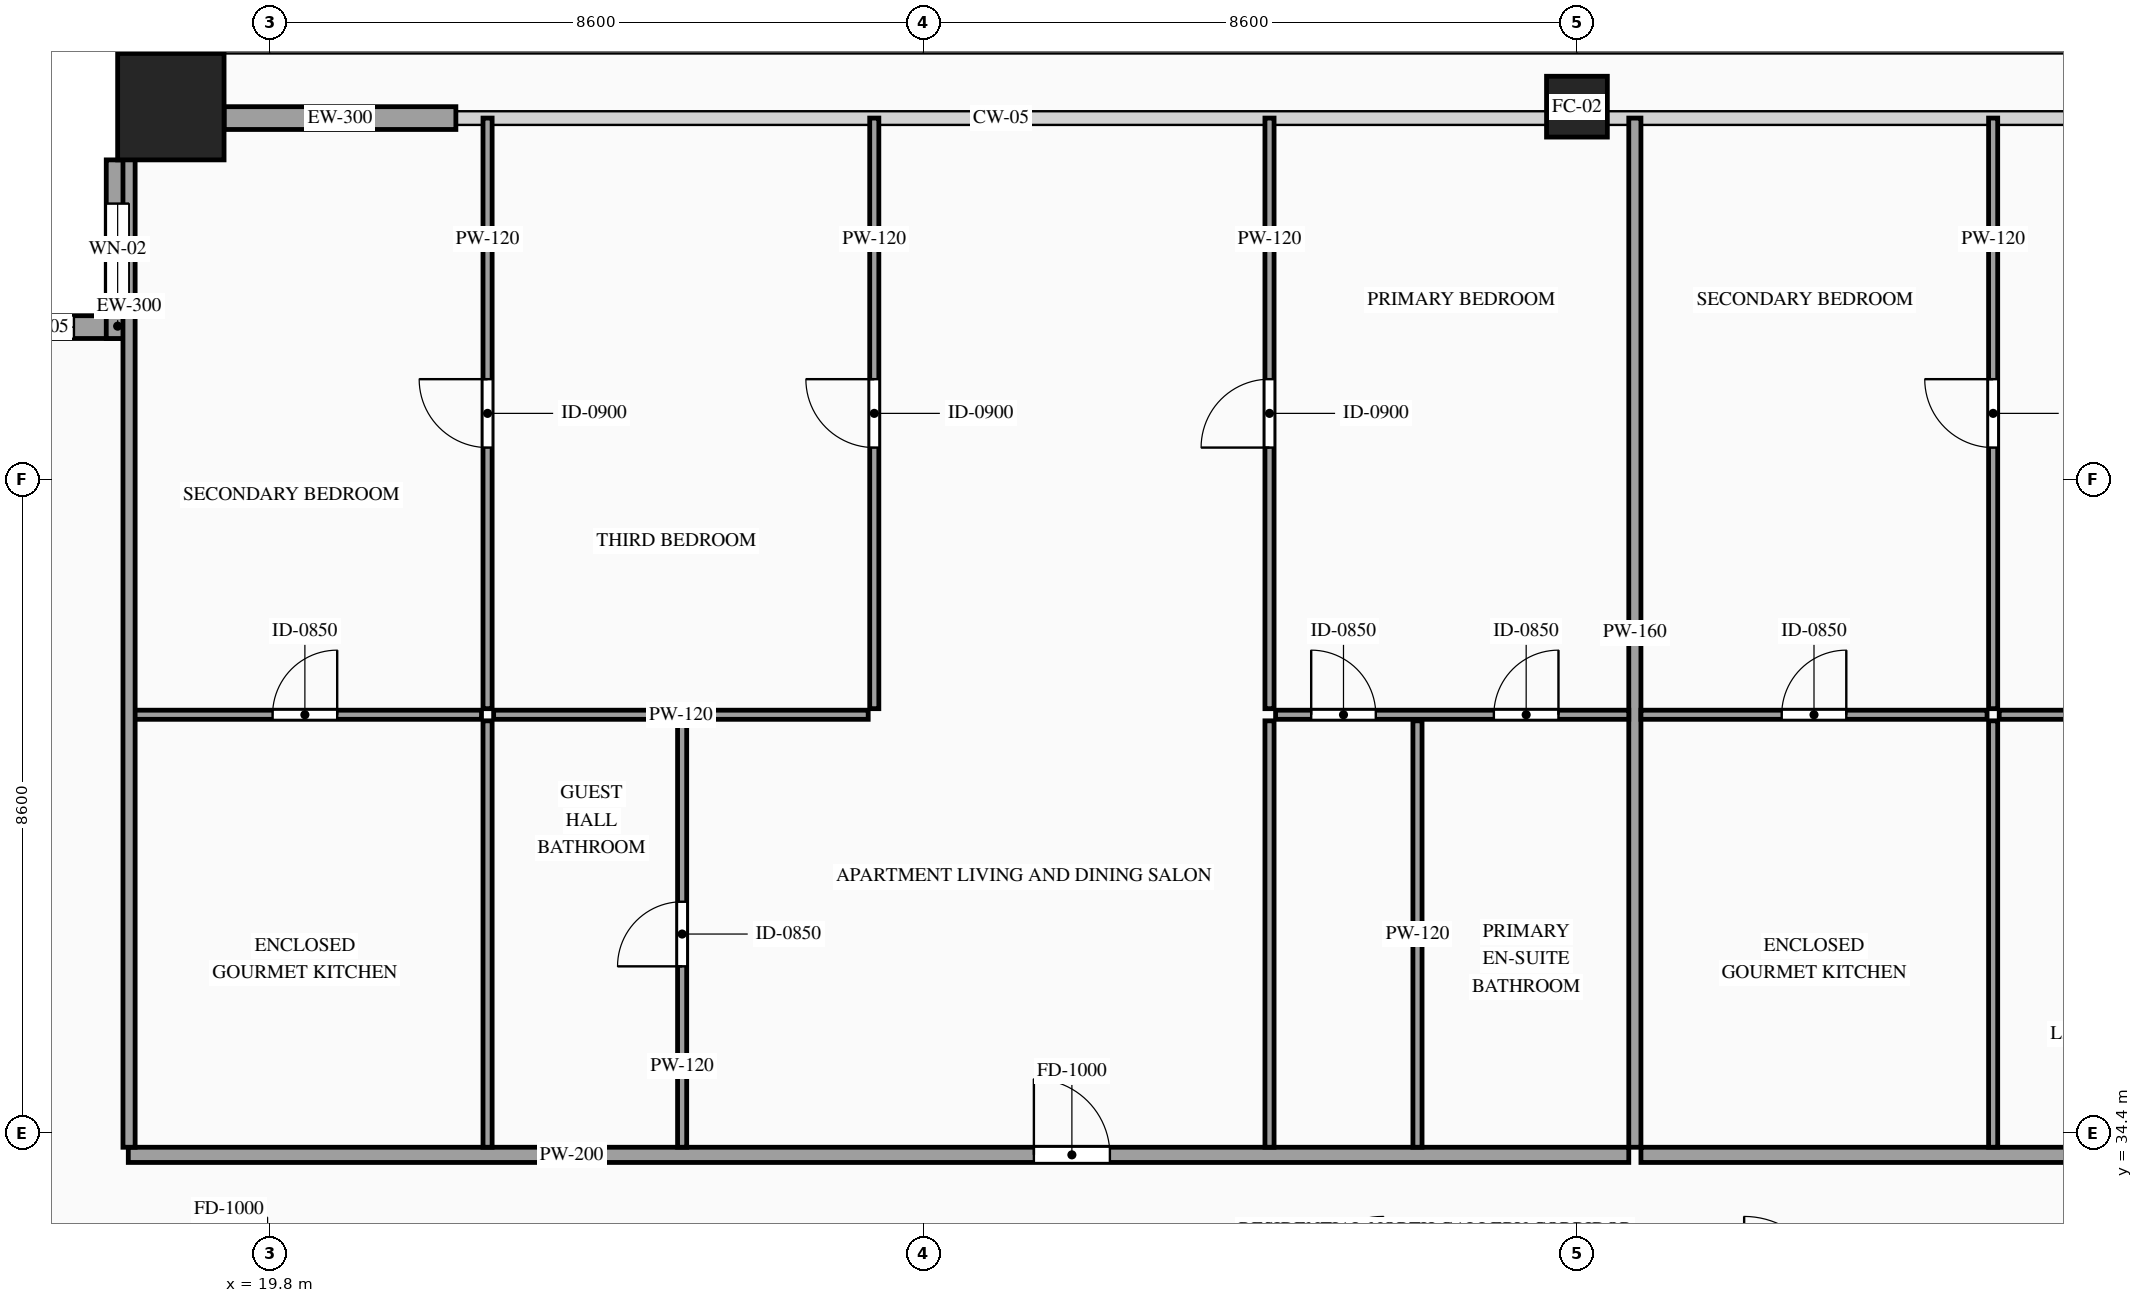
"""IFC4 building model, lengths in metres.
Left out: names, types, materials, properties, quantities, classifications, styles, units other than length and angle.
Written with IfcOpenShell. Run it as: python <this file> out.ifc"""

import sys

from ifc_helpers import new_model, si_unit, direction, frame, frame_2d, origin, origin_2d, place, context, subcontext, project, spatial, rectangle, hollow_rectangle, extrude, source, transform, mapped, element, fill, save


model = new_model("IFC4")
c1 = context("Model", 3, precision=1e-05, world=origin(), true_north=direction((0.0, 1.0)))
c2 = subcontext(c1, "Body", "Model", "MODEL_VIEW")
j1 = project(units=[si_unit("LENGTHUNIT", "METRE"), si_unit("PLANEANGLEUNIT", "RADIAN")], contexts=[c1])
p1 = place(None, origin())
s1 = spatial("IfcSite", under=j1, at=p1, CompositionType="ELEMENT")
p2 = place(p1, origin())
s2 = spatial("IfcBuilding", under=s1, at=p2, CompositionType="ELEMENT")
p3 = place(p2, frame((0.0, 0.0, 195.0)))
s3 = spatial("IfcBuildingStorey", under=s2, at=p3, CompositionType="ELEMENT", Elevation=195.0)
m1 = source(origin(), c2, "Body", "SweptSolid", [
    extrude(hollow_rectangle(XDim=1.4, YDim=1.4, WallThickness=0.06, at=origin_2d()), origin(), (0.0, 0.0, 1.0), 3.5),
])
p4 = place(p3, frame((18.5, 47.9, 0.0), z_axis=(0.0, 0.0, 1.0), x_axis=(1.0, 0.0, 0.0)))
e1 = element("IfcColumn", 1, at=p4, inside=s3, PredefinedType="COLUMN", context=c2, shape_type="MappedRepresentation", body=[
    mapped(m1, transform((0.0, 0.0, 0.0), scale=1.0)),
])
m2 = source(origin(), c2, "Body", "SweptSolid", [
    extrude(hollow_rectangle(XDim=0.8, YDim=0.8, WallThickness=0.036, at=origin_2d()), origin(), (0.0, 0.0, 1.0), 3.5),
])
p5 = place(p3, frame((37.0, 47.9, 0.0), z_axis=(0.0, 0.0, 1.0), x_axis=(1.0, 0.0, 0.0)))
e2 = element("IfcColumn", 2, at=p5, inside=s3, PredefinedType="COLUMN", context=c2, shape_type="MappedRepresentation", body=[
    mapped(m2, transform((0.0, 0.0, 0.0), scale=1.0)),
])
p6 = place(p3, frame((17.95, 45.0, 0.0), z_axis=(0.0, 0.0, 1.0), x_axis=(-1.0, 0.0, 0.0)))
e3 = element("IfcWall", 3, at=p6, inside=s3, PredefinedType="SOLIDWALL", context=c2, shape_type="SweptSolid", body=[
    extrude(rectangle(XDim=2.35, YDim=0.3, at=frame_2d((1.175, 0.0))), origin(), (0.0, 0.0, 1.0), 3.28),
])
p7 = place(p6, frame((0.725, 0.0, 0.85)))
e4 = element("IfcOpeningElement", 4, at=p7, cuts=e3, PredefinedType="OPENING", context=c2, shape_type="SweptSolid", body=[
    extrude(rectangle(XDim=0.9, YDim=1.5, at=frame_2d((0.45, 0.75))), frame((0.0, 0.165, 0.0), z_axis=(0.0, -1.0, 0.0), x_axis=(1.0, 0.0, 0.0)), (0.0, 0.0, 1.0), 0.33),
])
p8 = place(p3, frame((17.8, 47.2, 0.0), z_axis=(0.0, 0.0, 1.0), x_axis=(0.0, -1.0, 0.0)))
e5 = element("IfcWall", 5, at=p8, inside=s3, PredefinedType="SOLIDWALL", context=c2, shape_type="SweptSolid", body=[
    extrude(rectangle(XDim=2.35, YDim=0.3, at=frame_2d((1.175, 0.0))), origin(), (0.0, 0.0, 1.0), 3.28),
])
p9 = place(p8, frame((0.575, 0.0, 0.85)))
e6 = element("IfcOpeningElement", 6, at=p9, cuts=e5, PredefinedType="OPENING", context=c2, shape_type="SweptSolid", body=[
    extrude(rectangle(XDim=1.2, YDim=2.1, at=frame_2d((0.6, 1.05))), frame((0.0, 0.165, 0.0), z_axis=(0.0, -1.0, 0.0), x_axis=(1.0, 0.0, 0.0)), (0.0, 0.0, 1.0), 0.33),
])
m3 = source(origin(), c2, "Body", "SweptSolid", [
    extrude(rectangle(XDim=3.05, YDim=0.3, at=frame_2d((1.525, 0.0))), origin(), (0.0, 0.0, 1.0), 2.835),
])
p10 = place(p3, frame((19.2, 47.75, 0.0), z_axis=(0.0, 0.0, 1.0), x_axis=(1.0, 0.0, 0.0)))
e7 = element("IfcWall", 7, at=p10, inside=s3, PredefinedType="SOLIDWALL", context=c2, shape_type="MappedRepresentation", body=[
    mapped(m3, transform((0.0, 0.0, 0.0), scale=1.0)),
])
p11 = place(p3, frame((17.94, 34.11, 0.0), z_axis=(0.0, 0.0, 1.0), x_axis=(1.0, 0.0, 0.0)))
e8 = element("IfcWall", 8, at=p11, inside=s3, PredefinedType="PARTITIONING", context=c2, shape_type="SweptSolid", body=[
    extrude(rectangle(XDim=19.742, YDim=0.2, at=frame_2d((9.871, 0.0))), origin(), (0.0, 0.0, 1.0), 3.28),
])
p12 = place(p11, frame((11.915, 0.0, 0.0)))
e9 = element("IfcOpeningElement", 9, at=p12, cuts=e8, PredefinedType="OPENING", context=c2, shape_type="SweptSolid", body=[
    extrude(rectangle(XDim=1.0, YDim=2.2, at=frame_2d((0.5, 1.1))), frame((0.0, 0.115, 0.0), z_axis=(0.0, -1.0, 0.0), x_axis=(1.0, 0.0, 0.0)), (0.0, 0.0, 1.0), 0.23),
])
m4 = source(origin(), c2, "Body", "SweptSolid", [
    extrude(rectangle(XDim=13.54, YDim=0.16, at=frame_2d((6.77, 0.0))), origin(), (0.0, 0.0, 1.0), 3.28),
])
p13 = place(p3, frame((37.762, 34.21, 0.0), z_axis=(0.0, 0.0, 1.0), x_axis=(0.0, 1.0, 0.0)))
e10 = element("IfcWall", 10, at=p13, inside=s3, PredefinedType="PARTITIONING", context=c2, shape_type="MappedRepresentation", body=[
    mapped(m4, transform((0.0, 0.0, 0.0), scale=1.0)),
])
p14 = place(p3, frame((17.94, 39.9, 0.0), z_axis=(0.0, 0.0, 1.0), x_axis=(1.0, 0.0, 0.0)))
e11 = element("IfcWall", 11, at=p14, inside=s3, PredefinedType="PARTITIONING", context=c2, shape_type="SweptSolid", body=[
    extrude(rectangle(XDim=4.647, YDim=0.12, at=frame_2d((2.323, 0.0))), origin(), (0.0, 0.0, 1.0), 3.28),
])
p15 = place(p14, frame((1.898, 0.0, 0.0)))
e12 = element("IfcOpeningElement", 12, at=p15, cuts=e11, PredefinedType="OPENING", context=c2, shape_type="SweptSolid", body=[
    extrude(rectangle(XDim=0.85, YDim=2.1, at=frame_2d((0.425, 1.05))), frame((0.0, 0.075, 0.0), z_axis=(0.0, -1.0, 0.0), x_axis=(1.0, 0.0, 0.0)), (0.0, 0.0, 1.0), 0.15),
])
m5 = source(origin(), c2, "Body", "SweptSolid", [
    extrude(rectangle(XDim=5.61, YDim=0.12, at=frame_2d((2.805, 0.0))), origin(), (0.0, 0.0, 1.0), 3.28),
])
p16 = place(p3, frame((22.667, 34.21, 0.0), z_axis=(0.0, 0.0, 1.0), x_axis=(0.0, 1.0, 0.0)))
e13 = element("IfcWall", 13, at=p16, inside=s3, PredefinedType="PARTITIONING", context=c2, shape_type="MappedRepresentation", body=[
    mapped(m5, transform((0.0, 0.0, 0.0), scale=1.0)),
])
p17 = place(p3, frame((25.227, 34.21, 0.0), z_axis=(0.0, 0.0, 1.0), x_axis=(0.0, 1.0, 0.0)))
e14 = element("IfcWall", 14, at=p17, inside=s3, PredefinedType="PARTITIONING", context=c2, shape_type="SweptSolid", body=[
    extrude(rectangle(XDim=5.61, YDim=0.12, at=frame_2d((2.805, 0.0))), origin(), (0.0, 0.0, 1.0), 3.28),
])
p18 = place(p17, frame((2.38, 0.0, 0.0)))
e15 = element("IfcOpeningElement", 15, at=p18, cuts=e14, PredefinedType="OPENING", context=c2, shape_type="SweptSolid", body=[
    extrude(rectangle(XDim=0.85, YDim=2.1, at=frame_2d((0.425, 1.05))), frame((0.0, 0.075, 0.0), z_axis=(0.0, -1.0, 0.0), x_axis=(1.0, 0.0, 0.0)), (0.0, 0.0, 1.0), 0.15),
])
for number, where, z_axis, x_axis in (
    (16, (34.902, 34.21, 0.0), (0.0, 0.0, 1.0), (0.0, 1.0, 0.0)),
    (17, (32.955, 34.21, 0.0), (0.0, 0.0, 1.0), (0.0, 1.0, 0.0)),
):
    element("IfcWall", number, at=place(p3, frame(where, z_axis=z_axis, x_axis=x_axis)), inside=s3, PredefinedType="PARTITIONING", context=c2, shape_type="MappedRepresentation", body=[
        mapped(m5, transform((0.0, 0.0, 0.0), scale=1.0)),
    ])
p19 = place(p3, frame((22.667, 39.98, 0.0), z_axis=(0.0, 0.0, 1.0), x_axis=(0.0, 1.0, 0.0)))
e18 = element("IfcWall", 18, at=p19, inside=s3, PredefinedType="PARTITIONING", context=c2, shape_type="SweptSolid", body=[
    extrude(rectangle(XDim=7.77, YDim=0.12, at=frame_2d((3.885, 0.0))), origin(), (0.0, 0.0, 1.0), 3.28),
])
p20 = place(p19, frame((3.435, 0.0, 0.0)))
e19 = element("IfcOpeningElement", 19, at=p20, cuts=e18, PredefinedType="OPENING", context=c2, shape_type="SweptSolid", body=[
    extrude(rectangle(XDim=0.9, YDim=2.15, at=frame_2d((0.45, 1.075))), frame((0.0, 0.075, 0.0), z_axis=(0.0, -1.0, 0.0), x_axis=(1.0, 0.0, 0.0)), (0.0, 0.0, 1.0), 0.15),
])
p21 = place(p3, frame((33.035, 39.9, 0.0), z_axis=(0.0, 0.0, 1.0), x_axis=(1.0, 0.0, 0.0)))
e20 = element("IfcWall", 20, at=p21, inside=s3, PredefinedType="PARTITIONING", context=c2, shape_type="SweptSolid", body=[
    extrude(rectangle(XDim=4.647, YDim=0.12, at=frame_2d((2.323, 0.0))), origin(), (0.0, 0.0, 1.0), 2.875),
])
p22 = place(p21, frame((2.872, 0.0, 0.0)))
e21 = element("IfcOpeningElement", 21, at=p22, cuts=e20, PredefinedType="OPENING", context=c2, shape_type="SweptSolid", body=[
    extrude(rectangle(XDim=0.85, YDim=2.1, at=frame_2d((0.425, 1.05))), frame((0.0, 0.075, 0.0), z_axis=(0.0, -1.0, 0.0), x_axis=(1.0, 0.0, 0.0)), (0.0, 0.0, 1.0), 0.15),
])
p23 = place(p21, frame((0.469, 0.0, 0.0)))
e22 = element("IfcOpeningElement", 22, at=p23, cuts=e20, PredefinedType="OPENING", context=c2, shape_type="SweptSolid", body=[
    extrude(rectangle(XDim=0.85, YDim=2.1, at=frame_2d((0.425, 1.05))), frame((0.0, 0.075, 0.0), z_axis=(0.0, -1.0, 0.0), x_axis=(1.0, 0.0, 0.0)), (0.0, 0.0, 1.0), 0.15),
])
p24 = place(p3, frame((32.955, 39.98, 0.0), z_axis=(0.0, 0.0, 1.0), x_axis=(0.0, 1.0, 0.0)))
e23 = element("IfcWall", 23, at=p24, inside=s3, PredefinedType="PARTITIONING", context=c2, shape_type="SweptSolid", body=[
    extrude(rectangle(XDim=7.77, YDim=0.12, at=frame_2d((3.885, 0.0))), origin(), (0.0, 0.0, 1.0), 3.28),
])
p25 = place(p24, frame((3.435, 0.0, 0.0)))
e24 = element("IfcOpeningElement", 24, at=p25, cuts=e23, PredefinedType="OPENING", context=c2, shape_type="SweptSolid", body=[
    extrude(rectangle(XDim=0.9, YDim=2.15, at=frame_2d((0.45, 1.075))), frame((0.0, 0.075, 0.0), z_axis=(0.0, -1.0, 0.0), x_axis=(1.0, 0.0, 0.0)), (0.0, 0.0, 1.0), 0.15),
])
m6 = source(origin(), c2, "Body", "SweptSolid", [
    extrude(rectangle(XDim=4.928, YDim=0.12, at=frame_2d((2.464, 0.0))), origin(), (0.0, 0.0, 1.0), 2.875),
])
p26 = place(p3, frame((22.747, 39.9, 0.0), z_axis=(0.0, 0.0, 1.0), x_axis=(1.0, 0.0, 0.0)))
e25 = element("IfcWall", 25, at=p26, inside=s3, PredefinedType="PARTITIONING", context=c2, shape_type="MappedRepresentation", body=[
    mapped(m6, transform((0.0, 0.0, 0.0), scale=1.0)),
])
p27 = place(p3, frame((27.755, 39.98, 0.0), z_axis=(0.0, 0.0, 1.0), x_axis=(0.0, 1.0, 0.0)))
e26 = element("IfcWall", 26, at=p27, inside=s3, PredefinedType="PARTITIONING", context=c2, shape_type="SweptSolid", body=[
    extrude(rectangle(XDim=7.77, YDim=0.12, at=frame_2d((3.885, 0.0))), origin(), (0.0, 0.0, 1.0), 3.28),
])
p28 = place(p27, frame((3.435, 0.0, 0.0)))
e27 = element("IfcOpeningElement", 27, at=p28, cuts=e26, PredefinedType="OPENING", context=c2, shape_type="SweptSolid", body=[
    extrude(rectangle(XDim=0.9, YDim=2.15, at=frame_2d((0.45, 1.075))), frame((0.0, 0.075, 0.0), z_axis=(0.0, -1.0, 0.0), x_axis=(1.0, 0.0, 0.0)), (0.0, 0.0, 1.0), 0.15),
])
p29 = place(p3, frame((37.842, 34.11, 0.0), z_axis=(0.0, 0.0, 1.0), x_axis=(1.0, 0.0, 0.0)))
e28 = element("IfcWall", 28, at=p29, inside=s3, PredefinedType="PARTITIONING", context=c2, shape_type="SweptSolid", body=[
    extrude(rectangle(XDim=18.218, YDim=0.2, at=frame_2d((9.109, 0.0))), origin(), (0.0, 0.0, 1.0), 3.28),
])
p30 = place(p29, frame((10.556, 0.0, 0.0)))
e29 = element("IfcOpeningElement", 29, at=p30, cuts=e28, PredefinedType="OPENING", context=c2, shape_type="SweptSolid", body=[
    extrude(rectangle(XDim=1.0, YDim=2.2, at=frame_2d((0.5, 1.1))), frame((0.0, 0.115, 0.0), z_axis=(0.0, -1.0, 0.0), x_axis=(1.0, 0.0, 0.0)), (0.0, 0.0, 1.0), 0.23),
])
m7 = source(origin(), c2, "Body", "SweptSolid", [
    extrude(rectangle(XDim=13.39, YDim=0.16, at=frame_2d((6.695, 0.0))), origin(), (0.0, 0.0, 1.0), 3.28),
])
p31 = place(p3, frame((17.95, 34.21, 0.0), z_axis=(0.0, 0.0, 1.0), x_axis=(0.0, 1.0, 0.0)))
e30 = element("IfcWall", 30, at=p31, inside=s3, PredefinedType="PARTITIONING", context=c2, shape_type="MappedRepresentation", body=[
    mapped(m7, transform((0.0, 0.0, 0.0), scale=1.0)),
])
p32 = place(p3, frame((37.842, 39.9, 0.0), z_axis=(0.0, 0.0, 1.0), x_axis=(1.0, 0.0, 0.0)))
e31 = element("IfcWall", 31, at=p32, inside=s3, PredefinedType="PARTITIONING", context=c2, shape_type="SweptSolid", body=[
    extrude(rectangle(XDim=4.554, YDim=0.12, at=frame_2d((2.277, 0.0))), origin(), (0.0, 0.0, 1.0), 2.875),
])
p33 = place(p32, frame((1.852, 0.0, 0.0)))
e32 = element("IfcOpeningElement", 32, at=p33, cuts=e31, PredefinedType="OPENING", context=c2, shape_type="SweptSolid", body=[
    extrude(rectangle(XDim=0.85, YDim=2.1, at=frame_2d((0.425, 1.05))), frame((0.0, 0.075, 0.0), z_axis=(0.0, -1.0, 0.0), x_axis=(1.0, 0.0, 0.0)), (0.0, 0.0, 1.0), 0.15),
])
p34 = place(p3, frame((42.476, 34.21, 0.0), z_axis=(0.0, 0.0, 1.0), x_axis=(0.0, 1.0, 0.0)))
e33 = element("IfcWall", 33, at=p34, inside=s3, PredefinedType="PARTITIONING", context=c2, shape_type="MappedRepresentation", body=[
    mapped(m5, transform((0.0, 0.0, 0.0), scale=1.0)),
])
p35 = place(p3, frame((42.476, 39.98, 0.0), z_axis=(0.0, 0.0, 1.0), x_axis=(0.0, 1.0, 0.0)))
e34 = element("IfcWall", 34, at=p35, inside=s3, PredefinedType="PARTITIONING", context=c2, shape_type="SweptSolid", body=[
    extrude(rectangle(XDim=7.77, YDim=0.12, at=frame_2d((3.885, 0.0))), origin(), (0.0, 0.0, 1.0), 3.28),
])
p36 = place(p35, frame((3.435, 0.0, 0.0)))
e35 = element("IfcOpeningElement", 35, at=p36, cuts=e34, PredefinedType="OPENING", context=c2, shape_type="SweptSolid", body=[
    extrude(rectangle(XDim=0.9, YDim=2.15, at=frame_2d((0.45, 1.075))), frame((0.0, 0.075, 0.0), z_axis=(0.0, -1.0, 0.0), x_axis=(1.0, 0.0, 0.0)), (0.0, 0.0, 1.0), 0.15),
])
m8 = source(origin(), c2, "Body", "SweptSolid", [
    extrude(rectangle(XDim=3.827, YDim=0.12, at=frame_2d((1.914, 0.0))), origin(), (0.0, 0.0, 1.0), 2.875),
])
p37 = place(p3, frame((42.556, 39.9, 0.0), z_axis=(0.0, 0.0, 1.0), x_axis=(1.0, 0.0, 0.0)))
e36 = element("IfcWall", 36, at=p37, inside=s3, PredefinedType="PARTITIONING", context=c2, shape_type="MappedRepresentation", body=[
    mapped(m8, transform((0.0, 0.0, 0.0), scale=1.0)),
])
m9 = source(origin(), c2, "Body", "SweptSolid", [
    extrude(rectangle(XDim=0.9, YDim=1.5, at=frame_2d((0.45, 0.75))), frame((0.0, 0.03, 0.0), z_axis=(0.0, -1.0, 0.0), x_axis=(1.0, 0.0, 0.0)), (0.0, 0.0, 1.0), 0.06),
])
p38 = place(p7, origin())
e37 = element("IfcWindow", 37, at=p38, inside=s3, PartitioningType="SINGLE_PANEL", PredefinedType="WINDOW", context=c2, shape_type="MappedRepresentation", body=[
    mapped(m9, transform((0.0, 0.0, 0.0), scale=1.0)),
])
fill(e4, e37)
m10 = source(origin(), c2, "Body", "SweptSolid", [
    extrude(rectangle(XDim=1.2, YDim=2.1, at=frame_2d((0.6, 1.05))), frame((0.0, 0.03, 0.0), z_axis=(0.0, -1.0, 0.0), x_axis=(1.0, 0.0, 0.0)), (0.0, 0.0, 1.0), 0.06),
])
p39 = place(p9, origin())
e38 = element("IfcWindow", 38, at=p39, inside=s3, PartitioningType="SINGLE_PANEL", PredefinedType="WINDOW", context=c2, shape_type="MappedRepresentation", body=[
    mapped(m10, transform((0.0, 0.0, 0.0), scale=1.0)),
])
fill(e6, e38)
m11 = source(origin(), c2, "Body", "SweptSolid", [
    extrude(rectangle(XDim=1.0, YDim=2.2, at=frame_2d((0.5, 1.1))), frame((0.0, 0.025, 0.0), z_axis=(0.0, -1.0, 0.0), x_axis=(1.0, 0.0, 0.0)), (0.0, 0.0, 1.0), 0.05),
])
p40 = place(p12, origin())
e39 = element("IfcDoor", 39, at=p40, inside=s3, OperationType="SINGLE_SWING_LEFT", PredefinedType="DOOR", context=c2, shape_type="MappedRepresentation", body=[
    mapped(m11, transform((0.0, 0.0, 0.0), scale=1.0)),
])
fill(e9, e39)
m12 = source(origin(), c2, "Body", "SweptSolid", [
    extrude(rectangle(XDim=0.85, YDim=2.1, at=frame_2d((0.425, 1.05))), frame((0.0, 0.025, 0.0), z_axis=(0.0, -1.0, 0.0), x_axis=(1.0, 0.0, 0.0)), (0.0, 0.0, 1.0), 0.05),
])
p41 = place(p15, origin())
e40 = element("IfcDoor", 40, at=p41, inside=s3, OperationType="SINGLE_SWING_RIGHT", PredefinedType="DOOR", context=c2, shape_type="MappedRepresentation", body=[
    mapped(m12, transform((0.0, 0.0, 0.0), scale=1.0)),
])
fill(e12, e40)
p42 = place(p18, origin())
e41 = element("IfcDoor", 41, at=p42, inside=s3, OperationType="SINGLE_SWING_LEFT", PredefinedType="DOOR", context=c2, shape_type="MappedRepresentation", body=[
    mapped(m12, transform((0.0, 0.0, 0.0), scale=1.0)),
])
fill(e15, e41)
p43 = place(p22, origin())
e42 = element("IfcDoor", 42, at=p43, inside=s3, OperationType="SINGLE_SWING_RIGHT", PredefinedType="DOOR", context=c2, shape_type="MappedRepresentation", body=[
    mapped(m12, transform((0.0, 0.0, 0.0), scale=1.0)),
])
fill(e21, e42)
p44 = place(p23, origin())
e43 = element("IfcDoor", 43, at=p44, inside=s3, OperationType="SINGLE_SWING_LEFT", PredefinedType="DOOR", context=c2, shape_type="MappedRepresentation", body=[
    mapped(m12, transform((0.0, 0.0, 0.0), scale=1.0)),
])
fill(e22, e43)
m13 = source(origin(), c2, "Body", "SweptSolid", [
    extrude(rectangle(XDim=0.9, YDim=2.15, at=frame_2d((0.45, 1.075))), frame((0.0, 0.025, 0.0), z_axis=(0.0, -1.0, 0.0), x_axis=(1.0, 0.0, 0.0)), (0.0, 0.0, 1.0), 0.05),
])
p45 = place(p20, origin())
e44 = element("IfcDoor", 44, at=p45, inside=s3, OperationType="SINGLE_SWING_RIGHT", PredefinedType="DOOR", context=c2, shape_type="MappedRepresentation", body=[
    mapped(m13, transform((0.0, 0.0, 0.0), scale=1.0)),
])
fill(e19, e44)
p46 = place(p25, origin())
e45 = element("IfcDoor", 45, at=p46, inside=s3, OperationType="SINGLE_SWING_LEFT", PredefinedType="DOOR", context=c2, shape_type="MappedRepresentation", body=[
    mapped(m13, transform((0.0, 0.0, 0.0), scale=1.0)),
])
fill(e24, e45)
p47 = place(p28, origin())
e46 = element("IfcDoor", 46, at=p47, inside=s3, OperationType="SINGLE_SWING_RIGHT", PredefinedType="DOOR", context=c2, shape_type="MappedRepresentation", body=[
    mapped(m13, transform((0.0, 0.0, 0.0), scale=1.0)),
])
fill(e27, e46)
p48 = place(p33, origin())
e47 = element("IfcDoor", 47, at=p48, inside=s3, OperationType="SINGLE_SWING_RIGHT", PredefinedType="DOOR", context=c2, shape_type="MappedRepresentation", body=[
    mapped(m12, transform((0.0, 0.0, 0.0), scale=1.0)),
])
fill(e32, e47)
p49 = place(p36, origin())
e48 = element("IfcDoor", 48, at=p49, inside=s3, OperationType="SINGLE_SWING_RIGHT", PredefinedType="DOOR", context=c2, shape_type="MappedRepresentation", body=[
    mapped(m13, transform((0.0, 0.0, 0.0), scale=1.0)),
])
fill(e35, e48)
save(model, sys.argv[1])
